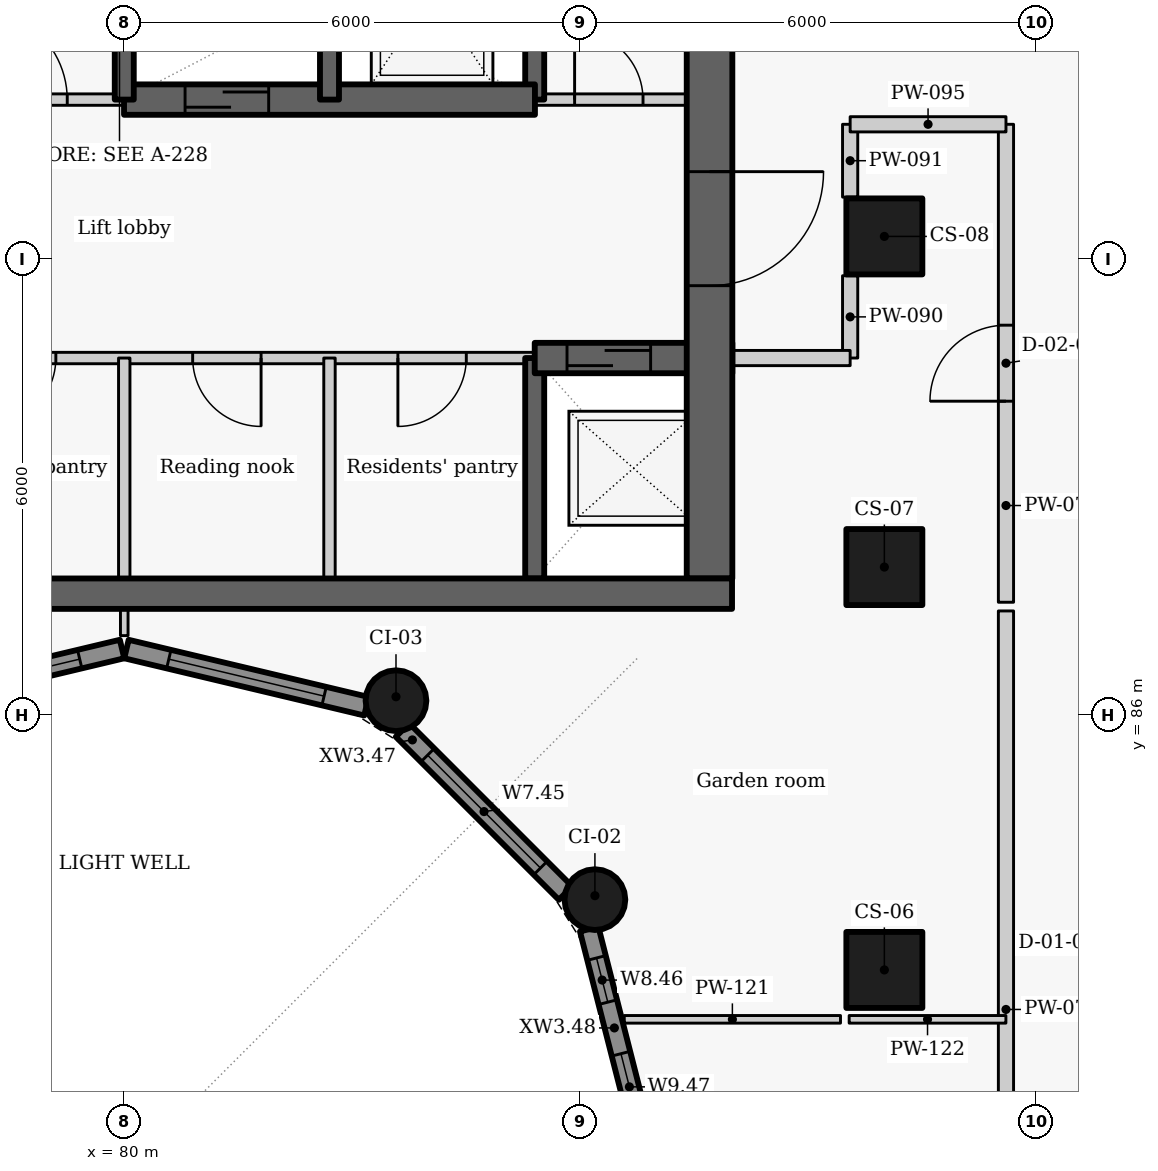
"""IFC4 building model, lengths in metres.
Left out: names, types, materials, properties, quantities, classifications, styles, units other than length and angle.
Written with IfcOpenShell. Run it as: python <this file> out.ifc"""

import sys

from ifc_helpers import new_model, si_unit, direction, frame, frame_2d, origin, origin_2d, place, context, subcontext, project, spatial, rectangle, circle, extrude, element, fill, save


model = new_model("IFC4")
c1 = context("Model", 3, precision=1e-05, world=origin(), true_north=direction((0.0, 1.0)))
c2 = subcontext(c1, "Body", "Model", "MODEL_VIEW")
j1 = project(units=[si_unit("LENGTHUNIT", "METRE"), si_unit("PLANEANGLEUNIT", "RADIAN")], contexts=[c1])
p1 = place(None, origin())
s1 = spatial("IfcSite", under=j1, at=p1, CompositionType="ELEMENT")
p2 = place(p1, origin())
s2 = spatial("IfcBuilding", under=s1, at=p2, CompositionType="ELEMENT")
p3 = place(p2, frame((0.0, 0.0, 160.2)))
s3 = spatial("IfcBuildingStorey", under=s2, at=p3, CompositionType="ELEMENT", Elevation=160.2)
for number, where, z_axis, x_axis in (
    (1, (90.0, 82.65, 0.0), (0.0, 0.0, 1.0), (0.0, 1.0, 0.0)),
    (2, (90.0, 87.95, 0.0), (0.0, 0.0, 1.0), (0.0, 1.0, 0.0)),
    (3, (90.0, 92.3, 0.0), (0.0, 0.0, 1.0), (0.0, 1.0, 0.0)),
):
    element("IfcColumn", number, at=place(p3, frame(where, z_axis=z_axis, x_axis=x_axis)), inside=s3, PredefinedType="COLUMN", context=c2, shape_type="SweptSolid", body=[
        extrude(rectangle(XDim=1.0, YDim=1.0, at=origin_2d()), origin(), (0.0, 0.0, 1.0), 3.3),
    ])
for number, where, z_axis, x_axis in (
    (4, (86.192, 83.575, 0.0), (0.0, 0.0, 1.0), (-0.5, 0.866, 0.0)),
    (5, (83.575, 86.192, 0.0), (0.0, 0.0, 1.0), (-0.866, 0.5, 0.0)),
):
    element("IfcColumn", number, at=place(p3, frame(where, z_axis=z_axis, x_axis=x_axis)), inside=s3, PredefinedType="COLUMN", context=c2, shape_type="SweptSolid", body=[
        extrude(circle(Radius=0.4, at=origin_2d()), origin(), (0.0, 0.0, 1.0), 3.3),
    ])
p4 = place(p3, frame((76.814, 86.119, 0.0), z_axis=(0.0, 0.0, 1.0), x_axis=(0.972773113459, 0.231759508395, 0.0)))
e6 = element("IfcWall", 6, at=p4, inside=s3, PredefinedType="SOLIDWALL", context=c2, shape_type="SweptSolid", body=[
    extrude(rectangle(XDim=3.246, YDim=0.25, at=frame_2d((1.623, 0.0))), origin(), (0.0, 0.0, 1.0), 2.425),
])
p5 = place(p4, frame((0.573, 0.0, 0.9)))
e7 = element("IfcOpeningElement", 7, at=p5, cuts=e6, PredefinedType="OPENING", context=c2, shape_type="SweptSolid", body=[
    extrude(rectangle(XDim=2.1, YDim=1.1, at=frame_2d((1.05, 0.55))), frame((0.0, 0.135, 0.0), z_axis=(0.0, -1.0, 0.0), x_axis=(1.0, 0.0, 0.0)), (0.0, 0.0, 1.0), 0.27),
])
p6 = place(p3, frame((80.029, 86.872, 0.0), z_axis=(0.0, 0.0, 1.0), x_axis=(0.972773113459, -0.231759508395, 0.0)))
e8 = element("IfcWall", 8, at=p6, inside=s3, PredefinedType="SOLIDWALL", context=c2, shape_type="SweptSolid", body=[
    extrude(rectangle(XDim=3.246, YDim=0.25, at=frame_2d((1.623, 0.0))), origin(), (0.0, 0.0, 1.0), 2.425),
])
p7 = place(p6, frame((0.573, 0.0, 0.9)))
e9 = element("IfcOpeningElement", 9, at=p7, cuts=e8, PredefinedType="OPENING", context=c2, shape_type="SweptSolid", body=[
    extrude(rectangle(XDim=2.1, YDim=1.1, at=frame_2d((1.05, 0.55))), frame((0.0, 0.135, 0.0), z_axis=(0.0, -1.0, 0.0), x_axis=(1.0, 0.0, 0.0)), (0.0, 0.0, 1.0), 0.27),
])
p8 = place(p3, frame((83.661, 85.806, 0.0), z_axis=(0.0, 0.0, 1.0), x_axis=(0.707106781187, -0.707106781187, 0.0)))
e10 = element("IfcWall", 10, at=p8, inside=s3, PredefinedType="SOLIDWALL", context=c2, shape_type="SweptSolid", body=[
    extrude(rectangle(XDim=3.033, YDim=0.25, at=frame_2d((1.517, 0.0))), origin(), (0.0, 0.0, 1.0), 2.425),
])
p9 = place(p8, frame((0.467, 0.0, 0.9)))
e11 = element("IfcOpeningElement", 11, at=p9, cuts=e10, PredefinedType="OPENING", context=c2, shape_type="SweptSolid", body=[
    extrude(rectangle(XDim=2.1, YDim=1.1, at=frame_2d((1.05, 0.55))), frame((0.0, 0.135, 0.0), z_axis=(0.0, -1.0, 0.0), x_axis=(1.0, 0.0, 0.0)), (0.0, 0.0, 1.0), 0.27),
])
p10 = place(p3, frame((86.117, 83.187, 0.0), z_axis=(0.0, 0.0, 1.0), x_axis=(0.247055971283, -0.969001211069, 0.0)))
e12 = element("IfcWall", 12, at=p10, inside=s3, PredefinedType="SOLIDWALL", context=c2, shape_type="SweptSolid", body=[
    extrude(rectangle(XDim=3.01, YDim=0.25, at=frame_2d((1.505, 0.0))), origin(), (0.0, 0.0, 1.0), 2.425),
])
p11 = place(p10, frame((0.392, 0.0, 0.9)))
e13 = element("IfcOpeningElement", 13, at=p11, cuts=e12, PredefinedType="OPENING", context=c2, shape_type="SweptSolid", body=[
    extrude(rectangle(XDim=0.6, YDim=1.1, at=frame_2d((0.3, 0.55))), frame((0.0, 0.135, 0.0), z_axis=(0.0, -1.0, 0.0), x_axis=(1.0, 0.0, 0.0)), (0.0, 0.0, 1.0), 0.27),
])
p12 = place(p10, frame((1.691, 0.0, 0.9)))
e14 = element("IfcOpeningElement", 14, at=p12, cuts=e12, PredefinedType="OPENING", context=c2, shape_type="SweptSolid", body=[
    extrude(rectangle(XDim=0.9, YDim=1.1, at=frame_2d((0.45, 0.55))), frame((0.0, 0.135, 0.0), z_axis=(0.0, -1.0, 0.0), x_axis=(1.0, 0.0, 0.0)), (0.0, 0.0, 1.0), 0.27),
])
p13 = place(p3, frame((85.4, 90.7, 0.0), z_axis=(0.0, 0.0, 1.0), x_axis=(-1.0, 0.0, 0.0)))
e15 = element("IfcWall", 15, at=p13, inside=s3, PredefinedType="PARTITIONING", context=c2, shape_type="SweptSolid", body=[
    extrude(rectangle(XDim=13.4, YDim=0.15, at=frame_2d((6.7, 0.0))), origin(), (0.0, 0.0, 1.0), 3.025),
])
p14 = place(p13, frame((11.325, 0.0, 0.0)))
e16 = element("IfcOpeningElement", 16, at=p14, cuts=e15, PredefinedType="OPENING", context=c2, shape_type="SweptSolid", body=[
    extrude(rectangle(XDim=0.9, YDim=2.1, at=frame_2d((0.45, 1.05))), frame((0.0, 0.085, 0.0), z_axis=(0.0, -1.0, 0.0), x_axis=(1.0, 0.0, 0.0)), (0.0, 0.0, 1.0), 0.17),
])
p15 = place(p13, frame((9.0, 0.0, 0.0)))
e17 = element("IfcOpeningElement", 17, at=p15, cuts=e15, PredefinedType="OPENING", context=c2, shape_type="SweptSolid", body=[
    extrude(rectangle(XDim=0.9, YDim=2.1, at=frame_2d((0.45, 1.05))), frame((0.0, 0.085, 0.0), z_axis=(0.0, -1.0, 0.0), x_axis=(1.0, 0.0, 0.0)), (0.0, 0.0, 1.0), 0.17),
])
p16 = place(p13, frame((6.3, 0.0, 0.0)))
e18 = element("IfcOpeningElement", 18, at=p16, cuts=e15, PredefinedType="OPENING", context=c2, shape_type="SweptSolid", body=[
    extrude(rectangle(XDim=0.9, YDim=2.1, at=frame_2d((0.45, 1.05))), frame((0.0, 0.085, 0.0), z_axis=(0.0, -1.0, 0.0), x_axis=(1.0, 0.0, 0.0)), (0.0, 0.0, 1.0), 0.17),
])
p17 = place(p13, frame((3.6, 0.0, 0.0)))
e19 = element("IfcOpeningElement", 19, at=p17, cuts=e15, PredefinedType="OPENING", context=c2, shape_type="SweptSolid", body=[
    extrude(rectangle(XDim=0.9, YDim=2.1, at=frame_2d((0.45, 1.05))), frame((0.0, 0.085, 0.0), z_axis=(0.0, -1.0, 0.0), x_axis=(1.0, 0.0, 0.0)), (0.0, 0.0, 1.0), 0.17),
])
p18 = place(p13, frame((0.9, 0.0, 0.0)))
e20 = element("IfcOpeningElement", 20, at=p18, cuts=e15, PredefinedType="OPENING", context=c2, shape_type="SweptSolid", body=[
    extrude(rectangle(XDim=0.9, YDim=2.1, at=frame_2d((0.45, 1.05))), frame((0.0, 0.085, 0.0), z_axis=(0.0, -1.0, 0.0), x_axis=(1.0, 0.0, 0.0)), (0.0, 0.0, 1.0), 0.17),
])
p19 = place(p3, frame((85.4, 87.8, -0.275), z_axis=(0.0, 0.0, 1.0), x_axis=(0.0, 1.0, 0.0)))
e21 = element("IfcWall", 21, at=p19, inside=s3, PredefinedType="SHEAR", context=c2, shape_type="SweptSolid", body=[
    extrude(rectangle(XDim=2.9, YDim=0.25, at=frame_2d((1.45, 0.0))), origin(), (0.0, 0.0, 1.0), 3.3),
])
p20 = place(p3, frame((85.4, 94.1, -0.275), z_axis=(0.0, 0.0, 1.0), x_axis=(0.0, 1.0, 0.0)))
e22 = element("IfcWall", 22, at=p20, inside=s3, PredefinedType="SHEAR", context=c2, shape_type="SweptSolid", body=[
    extrude(rectangle(XDim=2.8, YDim=0.25, at=frame_2d((1.4, 0.0))), origin(), (0.0, 0.0, 1.0), 3.3),
])
p21 = place(p3, frame((85.4, 90.7, -0.275), z_axis=(0.0, 0.0, 1.0), x_axis=(1.0, 0.0, 0.0)))
e23 = element("IfcWall", 23, at=p21, inside=s3, PredefinedType="SHEAR", context=c2, shape_type="SweptSolid", body=[
    extrude(rectangle(XDim=2.6, YDim=0.4, at=frame_2d((1.3, 0.0))), origin(), (0.0, 0.0, 1.0), 3.3),
])
p22 = place(p21, frame((0.425, 0.0, 0.275)))
e24 = element("IfcOpeningElement", 24, at=p22, cuts=e23, PredefinedType="OPENING", context=c2, shape_type="SweptSolid", body=[
    extrude(rectangle(XDim=1.1, YDim=2.1, at=frame_2d((0.55, 1.05))), frame((0.0, 0.21, 0.0), z_axis=(0.0, -1.0, 0.0), x_axis=(1.0, 0.0, 0.0)), (0.0, 0.0, 1.0), 0.42),
])
p23 = place(p3, frame((87.7, 103.4, -0.275), z_axis=(0.0, 0.0, 1.0), x_axis=(0.0, -1.0, 0.0)))
e25 = element("IfcWall", 25, at=p23, inside=s3, PredefinedType="SHEAR", context=c2, shape_type="SweptSolid", body=[
    extrude(rectangle(XDim=15.6, YDim=0.6, at=frame_2d((7.8, 0.0))), origin(), (0.0, 0.0, 1.0), 3.3),
])
p24 = place(p23, frame((10.248, 0.0, 0.275)))
e26 = element("IfcOpeningElement", 26, at=p24, cuts=e25, PredefinedType="OPENING", context=c2, shape_type="SweptSolid", body=[
    extrude(rectangle(XDim=1.5, YDim=2.1, at=frame_2d((0.75, 1.05))), frame((0.0, 0.31, 0.0), z_axis=(0.0, -1.0, 0.0), x_axis=(1.0, 0.0, 0.0)), (0.0, 0.0, 1.0), 0.62),
])
for number, where, z_axis, x_axis in (
    (27, (80.0, 87.8, 0.0), (0.0, 0.0, 1.0), (0.0, 1.0, 0.0)),
    (28, (82.7, 87.8, 0.0), (0.0, 0.0, 1.0), (0.0, 1.0, 0.0)),
):
    element("IfcWall", number, at=place(p3, frame(where, z_axis=z_axis, x_axis=x_axis)), inside=s3, PredefinedType="PARTITIONING", context=c2, shape_type="SweptSolid", body=[
        extrude(rectangle(XDim=2.9, YDim=0.15, at=frame_2d((1.45, 0.0))), origin(), (0.0, 0.0, 1.0), 3.025),
    ])
p25 = place(p3, frame((77.297, 94.1, 0.0), z_axis=(0.0, 0.0, 1.0), x_axis=(1.0, 0.0, 0.0)))
e29 = element("IfcWall", 29, at=p25, inside=s3, PredefinedType="PARTITIONING", context=c2, shape_type="SweptSolid", body=[
    extrude(rectangle(XDim=2.706, YDim=0.15, at=frame_2d((1.353, 0.0))), origin(), (0.0, 0.0, 1.0), 3.025),
])
p26 = place(p25, frame((0.753, 0.0, 0.0)))
e30 = element("IfcOpeningElement", 30, at=p26, cuts=e29, PredefinedType="OPENING", context=c2, shape_type="SweptSolid", body=[
    extrude(rectangle(XDim=1.2, YDim=2.1, at=frame_2d((0.6, 1.05))), frame((0.0, 0.085, 0.0), z_axis=(0.0, -1.0, 0.0), x_axis=(1.0, 0.0, 0.0)), (0.0, 0.0, 1.0), 0.17),
])
p27 = place(p3, frame((85.397, 94.1, 0.0), z_axis=(0.0, 0.0, 1.0), x_axis=(1.0, 0.0, 0.0)))
e31 = element("IfcWall", 31, at=p27, inside=s3, PredefinedType="PARTITIONING", context=c2, shape_type="SweptSolid", body=[
    extrude(rectangle(XDim=2.603, YDim=0.15, at=frame_2d((1.302, 0.0))), origin(), (0.0, 0.0, 1.0), 3.025),
])
p28 = place(p27, frame((0.528, 0.0, 0.0)))
e32 = element("IfcOpeningElement", 32, at=p28, cuts=e31, PredefinedType="OPENING", context=c2, shape_type="SweptSolid", body=[
    extrude(rectangle(XDim=0.9, YDim=2.1, at=frame_2d((0.45, 1.05))), frame((0.0, 0.085, 0.0), z_axis=(0.0, -1.0, 0.0), x_axis=(1.0, 0.0, 0.0)), (0.0, 0.0, 1.0), 0.17),
])
p29 = place(p3, frame((79.997, 94.1, -0.275), z_axis=(0.0, 0.0, 1.0), x_axis=(1.0, 0.0, 0.0)))
e33 = element("IfcWall", 33, at=p29, inside=s3, PredefinedType="SHEAR", context=c2, shape_type="SweptSolid", body=[
    extrude(rectangle(XDim=5.406, YDim=0.4, at=frame_2d((2.703, 0.0))), origin(), (0.0, 0.0, 1.0), 3.3),
])
p30 = place(p29, frame((0.803, 0.0, 0.275)))
e34 = element("IfcOpeningElement", 34, at=p30, cuts=e33, PredefinedType="OPENING", context=c2, shape_type="SweptSolid", body=[
    extrude(rectangle(XDim=1.1, YDim=2.1, at=frame_2d((0.55, 1.05))), frame((0.0, 0.21, 0.0), z_axis=(0.0, -1.0, 0.0), x_axis=(1.0, 0.0, 0.0)), (0.0, 0.0, 1.0), 0.42),
])
for number, where, z_axis, x_axis in (
    (35, (80.0, 94.1, -0.275), (0.0, 0.0, 1.0), (0.0, 1.0, 0.0)),
    (36, (82.7, 94.1, -0.275), (0.0, 0.0, 1.0), (0.0, 1.0, 0.0)),
):
    element("IfcWall", number, at=place(p3, frame(where, z_axis=z_axis, x_axis=x_axis)), inside=s3, PredefinedType="SHEAR", context=c2, shape_type="SweptSolid", body=[
        extrude(rectangle(XDim=2.8, YDim=0.25, at=frame_2d((1.4, 0.0))), origin(), (0.0, 0.0, 1.0), 3.3),
    ])
p31 = place(p3, frame((91.6, 76.887, 0.0), z_axis=(0.0, 0.0, 1.0), x_axis=(0.0, 1.0, 0.0)))
e37 = element("IfcWall", 37, at=p31, inside=s3, PredefinedType="PARTITIONING", context=c2, shape_type="SweptSolid", body=[
    extrude(rectangle(XDim=10.486, YDim=0.2, at=frame_2d((5.243, 0.0))), origin(), (0.0, 0.0, 1.0), 3.025),
])
p32 = place(p3, frame((91.6, 87.487, 0.0), z_axis=(0.0, 0.0, 1.0), x_axis=(0.0, 1.0, 0.0)))
e38 = element("IfcWall", 38, at=p32, inside=s3, PredefinedType="PARTITIONING", context=c2, shape_type="SweptSolid", body=[
    extrude(rectangle(XDim=6.288, YDim=0.2, at=frame_2d((3.144, 0.0))), origin(), (0.0, 0.0, 1.0), 3.025),
])
p33 = place(p32, frame((2.645, 0.0, 0.0)))
e39 = element("IfcOpeningElement", 39, at=p33, cuts=e38, PredefinedType="OPENING", context=c2, shape_type="SweptSolid", body=[
    extrude(rectangle(XDim=1.0, YDim=2.1, at=frame_2d((0.5, 1.05))), frame((0.0, 0.11, 0.0), z_axis=(0.0, -1.0, 0.0), x_axis=(1.0, 0.0, 0.0)), (0.0, 0.0, 1.0), 0.22),
])
p34 = place(p3, frame((89.55, 90.7, 0.0), z_axis=(0.0, 0.0, 1.0), x_axis=(0.0, 1.0, 0.0)))
e40 = element("IfcWall", 40, at=p34, inside=s3, PredefinedType="PARTITIONING", context=c2, shape_type="SweptSolid", body=[
    extrude(rectangle(XDim=1.083, YDim=0.2, at=frame_2d((0.542, 0.0))), origin(), (0.0, 0.0, 1.0), 3.025),
])
p35 = place(p3, frame((89.55, 92.817, 0.0), z_axis=(0.0, 0.0, 1.0), x_axis=(0.0, 1.0, 0.0)))
e41 = element("IfcWall", 41, at=p35, inside=s3, PredefinedType="PARTITIONING", context=c2, shape_type="SweptSolid", body=[
    extrude(rectangle(XDim=0.958, YDim=0.2, at=frame_2d((0.479, 0.0))), origin(), (0.0, 0.0, 1.0), 3.025),
])
p36 = place(p3, frame((89.55, 93.775, 0.0), z_axis=(0.0, 0.0, 1.0), x_axis=(1.0, 0.0, 0.0)))
e42 = element("IfcWall", 42, at=p36, inside=s3, PredefinedType="PARTITIONING", context=c2, shape_type="SweptSolid", body=[
    extrude(rectangle(XDim=2.05, YDim=0.2, at=frame_2d((1.025, 0.0))), origin(), (0.0, 0.0, 1.0), 2.505),
])
p37 = place(p3, frame((88.0, 90.7, 0.0), z_axis=(0.0, 0.0, 1.0), x_axis=(1.0, 0.0, 0.0)))
e43 = element("IfcWall", 43, at=p37, inside=s3, PredefinedType="PARTITIONING", context=c2, shape_type="SweptSolid", body=[
    extrude(rectangle(XDim=1.55, YDim=0.2, at=frame_2d((0.775, 0.0))), origin(), (0.0, 0.0, 1.0), 3.025),
])
p38 = place(p3, frame((80.0, 87.048, 0.0), z_axis=(0.0, 0.0, 1.0), x_axis=(0.0, 1.0, 0.0)))
e44 = element("IfcWall", 44, at=p38, inside=s3, PredefinedType="PARTITIONING", context=c2, shape_type="SweptSolid", body=[
    extrude(rectangle(XDim=0.352, YDim=0.1, at=frame_2d((0.176, 0.0))), origin(), (0.0, 0.0, 1.0), 3.025),
])
p39 = place(p3, frame((86.578, 82.0, 0.0), z_axis=(0.0, 0.0, 1.0), x_axis=(1.0, 0.0, 0.0)))
e45 = element("IfcWall", 45, at=p39, inside=s3, PredefinedType="PARTITIONING", context=c2, shape_type="SweptSolid", body=[
    extrude(rectangle(XDim=2.845, YDim=0.1, at=frame_2d((1.422, 0.0))), origin(), (0.0, 0.0, 1.0), 3.025),
])
p40 = place(p3, frame((89.537, 82.0, 0.0), z_axis=(0.0, 0.0, 1.0), x_axis=(1.0, 0.0, 0.0)))
e46 = element("IfcWall", 46, at=p40, inside=s3, PredefinedType="PARTITIONING", context=c2, shape_type="SweptSolid", body=[
    extrude(rectangle(XDim=2.062, YDim=0.1, at=frame_2d((1.031, 0.0))), origin(), (0.0, 0.0, 1.0), 2.505),
])
p41 = place(p3, frame((72.004, 87.6, -0.275), z_axis=(0.0, 0.0, 1.0), x_axis=(1.0, 0.0, 0.0)))
e47 = element("IfcWall", 47, at=p41, inside=s3, PredefinedType="SHEAR", context=c2, shape_type="SweptSolid", body=[
    extrude(rectangle(XDim=15.992, YDim=0.4, at=frame_2d((7.996, 0.0))), origin(), (0.0, 0.0, 1.0), 3.3),
])
p42 = place(p5, origin())
e48 = element("IfcWindow", 48, at=p42, inside=s3, PartitioningType="SINGLE_PANEL", PredefinedType="WINDOW", context=c2, shape_type="SweptSolid", body=[
    extrude(rectangle(XDim=2.1, YDim=1.1, at=frame_2d((1.05, 0.55))), frame((0.0, 0.03, 0.0), z_axis=(0.0, -1.0, 0.0), x_axis=(1.0, 0.0, 0.0)), (0.0, 0.0, 1.0), 0.06),
])
fill(e7, e48)
p43 = place(p7, origin())
e49 = element("IfcWindow", 49, at=p43, inside=s3, PartitioningType="SINGLE_PANEL", PredefinedType="WINDOW", context=c2, shape_type="SweptSolid", body=[
    extrude(rectangle(XDim=2.1, YDim=1.1, at=frame_2d((1.05, 0.55))), frame((0.0, 0.03, 0.0), z_axis=(0.0, -1.0, 0.0), x_axis=(1.0, 0.0, 0.0)), (0.0, 0.0, 1.0), 0.06),
])
fill(e9, e49)
p44 = place(p9, origin())
e50 = element("IfcWindow", 50, at=p44, inside=s3, PartitioningType="SINGLE_PANEL", PredefinedType="WINDOW", context=c2, shape_type="SweptSolid", body=[
    extrude(rectangle(XDim=2.1, YDim=1.1, at=frame_2d((1.05, 0.55))), frame((0.0, 0.03, 0.0), z_axis=(0.0, -1.0, 0.0), x_axis=(1.0, 0.0, 0.0)), (0.0, 0.0, 1.0), 0.06),
])
fill(e11, e50)
p45 = place(p11, origin())
e51 = element("IfcWindow", 51, at=p45, inside=s3, PartitioningType="SINGLE_PANEL", PredefinedType="WINDOW", context=c2, shape_type="SweptSolid", body=[
    extrude(rectangle(XDim=0.6, YDim=1.1, at=frame_2d((0.3, 0.55))), frame((0.0, 0.03, 0.0), z_axis=(0.0, -1.0, 0.0), x_axis=(1.0, 0.0, 0.0)), (0.0, 0.0, 1.0), 0.06),
])
fill(e13, e51)
p46 = place(p12, origin())
e52 = element("IfcWindow", 52, at=p46, inside=s3, PartitioningType="SINGLE_PANEL", PredefinedType="WINDOW", context=c2, shape_type="SweptSolid", body=[
    extrude(rectangle(XDim=0.9, YDim=1.1, at=frame_2d((0.45, 0.55))), frame((0.0, 0.03, 0.0), z_axis=(0.0, -1.0, 0.0), x_axis=(1.0, 0.0, 0.0)), (0.0, 0.0, 1.0), 0.06),
])
fill(e14, e52)
p47 = place(p22, origin())
e53 = element("IfcDoor", 53, at=p47, inside=s3, OperationType="SLIDING_TO_LEFT", PredefinedType="DOOR", context=c2, shape_type="SweptSolid", body=[
    extrude(rectangle(XDim=1.1, YDim=2.1, at=frame_2d((0.55, 1.05))), frame((0.0, 0.025, 0.0), z_axis=(0.0, -1.0, 0.0), x_axis=(1.0, 0.0, 0.0)), (0.0, 0.0, 1.0), 0.05),
])
fill(e24, e53)
p48 = place(p16, origin())
e54 = element("IfcDoor", 54, at=p48, inside=s3, OperationType="SINGLE_SWING_RIGHT", PredefinedType="DOOR", context=c2, shape_type="SweptSolid", body=[
    extrude(rectangle(XDim=0.9, YDim=2.1, at=frame_2d((0.45, 1.05))), frame((0.0, 0.025, 0.0), z_axis=(0.0, -1.0, 0.0), x_axis=(1.0, 0.0, 0.0)), (0.0, 0.0, 1.0), 0.05),
])
fill(e18, e54)
p49 = place(p17, origin())
e55 = element("IfcDoor", 55, at=p49, inside=s3, OperationType="SINGLE_SWING_LEFT", PredefinedType="DOOR", context=c2, shape_type="SweptSolid", body=[
    extrude(rectangle(XDim=0.9, YDim=2.1, at=frame_2d((0.45, 1.05))), frame((0.0, 0.025, 0.0), z_axis=(0.0, -1.0, 0.0), x_axis=(1.0, 0.0, 0.0)), (0.0, 0.0, 1.0), 0.05),
])
fill(e19, e55)
p50 = place(p18, origin())
e56 = element("IfcDoor", 56, at=p50, inside=s3, OperationType="SINGLE_SWING_RIGHT", PredefinedType="DOOR", context=c2, shape_type="SweptSolid", body=[
    extrude(rectangle(XDim=0.9, YDim=2.1, at=frame_2d((0.45, 1.05))), frame((0.0, 0.025, 0.0), z_axis=(0.0, -1.0, 0.0), x_axis=(1.0, 0.0, 0.0)), (0.0, 0.0, 1.0), 0.05),
])
fill(e20, e56)
p51 = place(p26, origin())
e57 = element("IfcDoor", 57, at=p51, inside=s3, OperationType="DOUBLE_DOOR_SINGLE_SWING", PredefinedType="DOOR", context=c2, shape_type="SweptSolid", body=[
    extrude(rectangle(XDim=1.2, YDim=2.1, at=frame_2d((0.6, 1.05))), frame((0.0, 0.025, 0.0), z_axis=(0.0, -1.0, 0.0), x_axis=(1.0, 0.0, 0.0)), (0.0, 0.0, 1.0), 0.05),
])
fill(e30, e57)
p52 = place(p30, origin())
e58 = element("IfcDoor", 58, at=p52, inside=s3, OperationType="SLIDING_TO_LEFT", PredefinedType="DOOR", context=c2, shape_type="SweptSolid", body=[
    extrude(rectangle(XDim=1.1, YDim=2.1, at=frame_2d((0.55, 1.05))), frame((0.0, 0.025, 0.0), z_axis=(0.0, -1.0, 0.0), x_axis=(1.0, 0.0, 0.0)), (0.0, 0.0, 1.0), 0.05),
])
fill(e34, e58)
p53 = place(p28, origin())
e59 = element("IfcDoor", 59, at=p53, inside=s3, OperationType="SINGLE_SWING_LEFT", PredefinedType="DOOR", context=c2, shape_type="SweptSolid", body=[
    extrude(rectangle(XDim=0.9, YDim=2.1, at=frame_2d((0.45, 1.05))), frame((0.0, 0.025, 0.0), z_axis=(0.0, -1.0, 0.0), x_axis=(1.0, 0.0, 0.0)), (0.0, 0.0, 1.0), 0.05),
])
fill(e32, e59)
p54 = place(p33, origin())
e60 = element("IfcDoor", 60, at=p54, inside=s3, OperationType="SINGLE_SWING_LEFT", PredefinedType="DOOR", context=c2, shape_type="SweptSolid", body=[
    extrude(rectangle(XDim=1.0, YDim=2.1, at=frame_2d((0.5, 1.05))), frame((0.0, 0.025, 0.0), z_axis=(0.0, -1.0, 0.0), x_axis=(1.0, 0.0, 0.0)), (0.0, 0.0, 1.0), 0.05),
])
fill(e39, e60)
p55 = place(p24, origin())
e61 = element("IfcDoor", 61, at=p55, inside=s3, OperationType="DOUBLE_DOOR_SINGLE_SWING", PredefinedType="DOOR", context=c2, shape_type="SweptSolid", body=[
    extrude(rectangle(XDim=1.5, YDim=2.1, at=frame_2d((0.75, 1.05))), frame((0.0, 0.025, 0.0), z_axis=(0.0, -1.0, 0.0), x_axis=(1.0, 0.0, 0.0)), (0.0, 0.0, 1.0), 0.05),
])
fill(e26, e61)
save(model, sys.argv[1])
